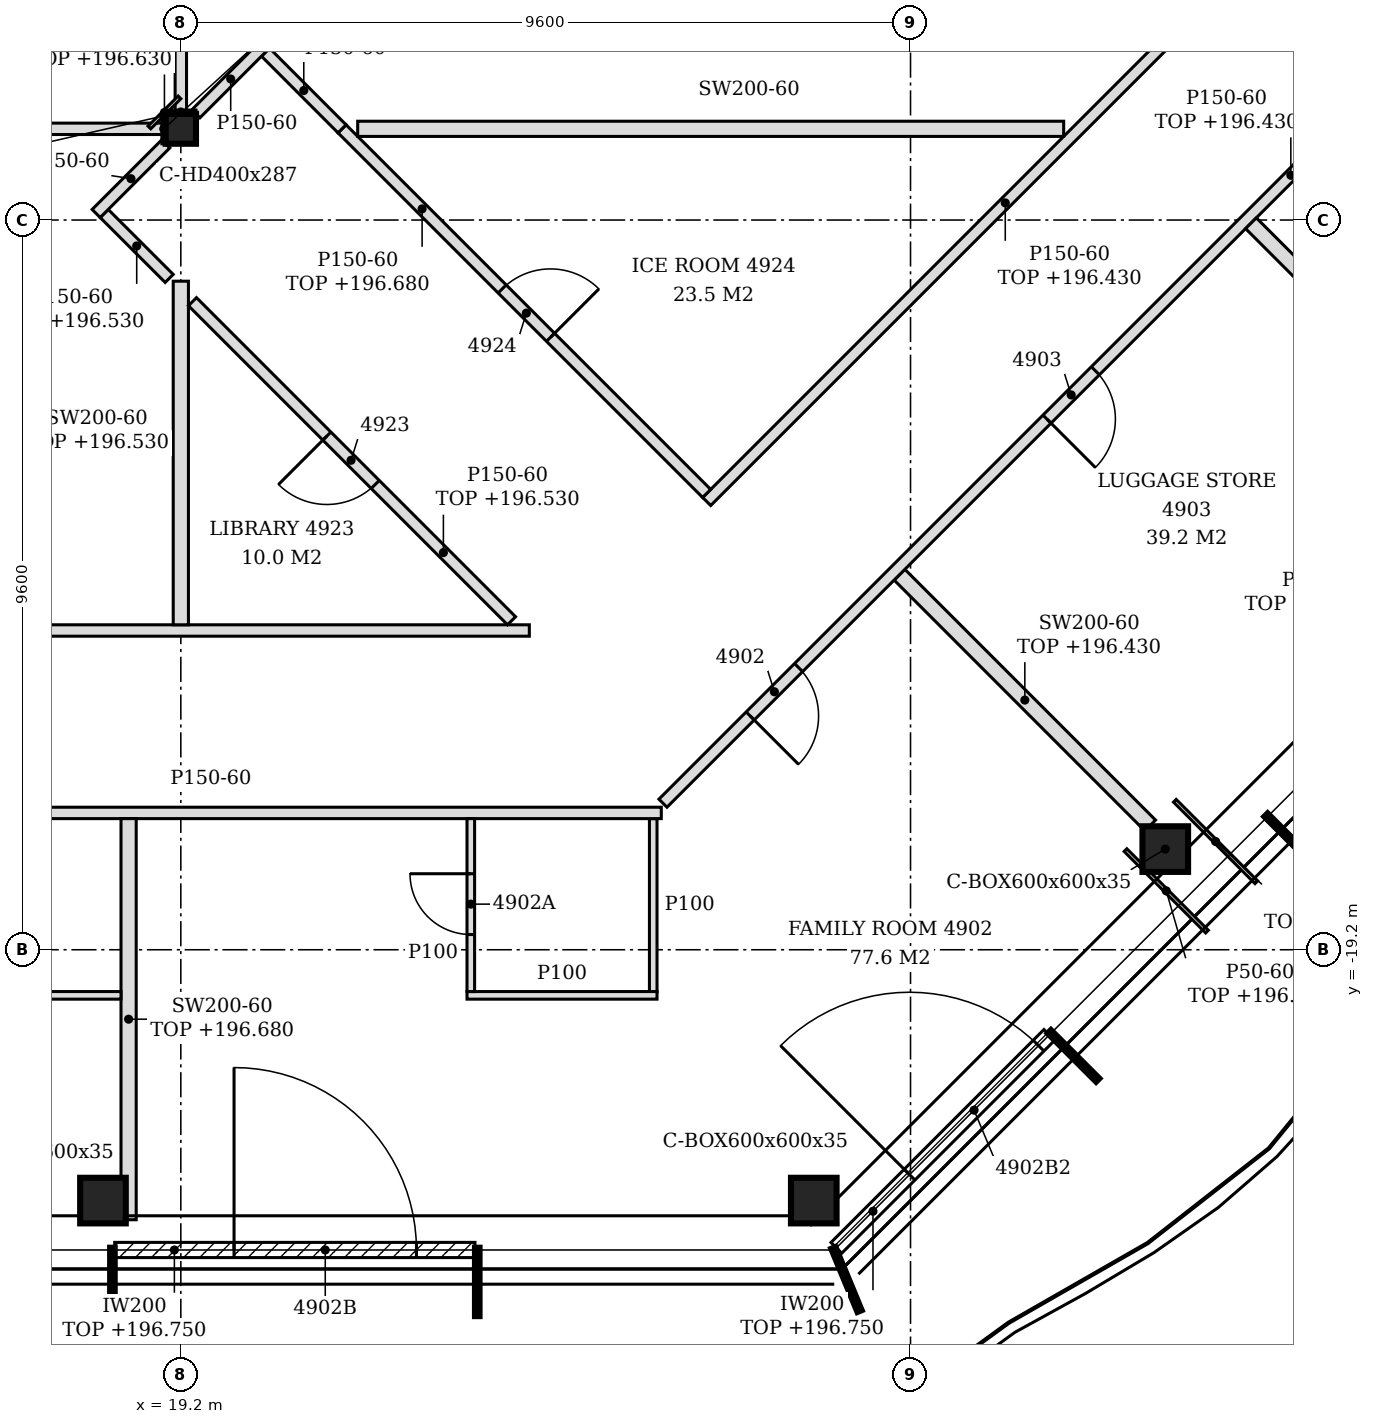
"""IFC4 building model, lengths in metres.
Left out: names, types, materials, properties, quantities, classifications, styles, units other than length and angle.
Written with IfcOpenShell. Run it as: python <this file> out.ifc"""

import sys

from ifc_helpers import new_model, si_unit, direction, frame, frame_2d, origin, origin_2d, place, context, subcontext, project, spatial, polyline, rectangle, hollow_rectangle, i_section, outline, extrude, clip, halfspace, element, fill, save


model = new_model("IFC4")
c1 = context("Model", 3, precision=1e-05, world=origin(), true_north=direction((0.0, 1.0)))
c2 = subcontext(c1, "Body", "Model", "MODEL_VIEW")
j1 = project(units=[si_unit("LENGTHUNIT", "METRE"), si_unit("PLANEANGLEUNIT", "RADIAN")], contexts=[c1])
p1 = place(None, origin())
s1 = spatial("IfcSite", under=j1, at=p1, CompositionType="ELEMENT")
p2 = place(p1, origin())
s2 = spatial("IfcBuilding", under=s1, at=p2, CompositionType="ELEMENT")
p3 = place(p2, frame((0.0, 0.0, 193.8)))
s3 = spatial("IfcBuildingStorey", under=s2, at=p3, CompositionType="ELEMENT", Elevation=193.8)
p4 = place(p3, frame((18.176, -22.5, -0.15), z_axis=(0.182857646312, -0.121927149838, 0.975549512489), x_axis=(0.554769659169, 0.83200398152, 0.0)))
e1 = element("IfcColumn", 1, at=p4, inside=s3, PredefinedType="COLUMN", context=c2, shape_type="Clipping", body=[
    clip(clip(extrude(hollow_rectangle(XDim=0.6, YDim=0.6, WallThickness=0.035, at=origin_2d()), origin(), (0.0, 0.0, 1.0), 3.69), halfspace(frame((0.0, 0.0, 0.021), z_axis=(0.0, 0.0, 1.0), x_axis=(1.0, 0.0, 0.0)), True)), halfspace(frame((0.0, 0.0, 3.668), z_axis=(0.0, 0.0, 1.0), x_axis=(1.0, 0.0, 0.0)), False)),
])
p5 = place(p3, frame((27.527, -22.5, -0.15), z_axis=(0.18292158996, -0.12192567461, 0.97553770906), x_axis=(0.55463074681, 0.832096589761, 0.0)))
e2 = element("IfcColumn", 2, at=p5, inside=s3, PredefinedType="COLUMN", context=c2, shape_type="Clipping", body=[
    clip(clip(extrude(hollow_rectangle(XDim=0.6, YDim=0.6, WallThickness=0.035, at=origin_2d()), origin(), (0.0, 0.0, 1.0), 3.69), halfspace(frame((0.0, 0.0, 0.021), z_axis=(0.0, 0.0, 1.0), x_axis=(1.0, 0.0, 0.0)), True)), halfspace(frame((0.0, 0.0, 3.668), z_axis=(0.0, 0.0, 1.0), x_axis=(1.0, 0.0, 0.0)), False)),
])
p6 = place(p3, frame((32.152, -17.876, -0.15), z_axis=(0.182857646312, -0.121927149838, 0.975549512489), x_axis=(0.554769659169, 0.83200398152, 0.0)))
e3 = element("IfcColumn", 3, at=p6, inside=s3, PredefinedType="COLUMN", context=c2, shape_type="Clipping", body=[
    clip(clip(extrude(hollow_rectangle(XDim=0.6, YDim=0.6, WallThickness=0.035, at=origin_2d()), origin(), (0.0, 0.0, 1.0), 3.69), halfspace(frame((0.0, 0.0, 0.021), z_axis=(0.0, 0.0, 1.0), x_axis=(1.0, 0.0, 0.0)), True)), halfspace(frame((0.0, 0.0, 3.668), z_axis=(0.0, 0.0, 1.0), x_axis=(1.0, 0.0, 0.0)), False)),
])
p7 = place(p3, frame((19.2, -8.4, -0.15), z_axis=(0.0, 0.0, 1.0), x_axis=(1.0, 0.0, 0.0)))
e4 = element("IfcColumn", 4, at=p7, inside=s3, PredefinedType="COLUMN", context=c2, shape_type="SweptSolid", body=[
    extrude(i_section(OverallWidth=0.399, OverallDepth=0.393, WebThickness=0.023, FlangeThickness=0.037, FilletRadius=0.015, at=origin_2d()), origin(), (0.0, 0.0, 1.0), 3.6),
])
p8 = place(p3, frame((18.33, -23.15, 0.0), z_axis=(0.0, 0.0, 1.0), x_axis=(1.0, 0.0, 0.0)))
e5 = element("IfcWall", 5, at=p8, inside=s3, PredefinedType="NOTDEFINED", context=c2, shape_type="SweptSolid", body=[
    extrude(rectangle(XDim=4.74, YDim=0.2, at=frame_2d((2.37, 0.0))), origin(), (0.0, 0.0, 1.0), 2.95),
])
p9 = place(p8, frame((1.57, 0.0, 0.0)))
e6 = element("IfcOpeningElement", 6, at=p9, cuts=e5, PredefinedType="OPENING", context=c2, shape_type="SweptSolid", body=[
    extrude(rectangle(XDim=2.4, YDim=2.4, at=frame_2d((1.2, 1.2))), frame((0.0, 0.11, 0.0), z_axis=(0.0, -1.0, 0.0), x_axis=(1.0, 0.0, 0.0)), (0.0, 0.0, 1.0), 0.22),
])
p10 = place(p3, frame((27.825, -23.122, 0.0), z_axis=(0.0, 0.0, 1.0), x_axis=(0.707106781187, 0.707106781187, 0.0)))
e7 = element("IfcWall", 7, at=p10, inside=s3, PredefinedType="NOTDEFINED", context=c2, shape_type="SweptSolid", body=[
    extrude(rectangle(XDim=3.962, YDim=0.2, at=frame_2d((1.981, 0.0))), origin(), (0.0, 0.0, 1.0), 2.95),
])
p11 = place(p10, frame((1.362, 0.0, 0.0)))
e8 = element("IfcOpeningElement", 8, at=p11, cuts=e7, PredefinedType="OPENING", context=c2, shape_type="SweptSolid", body=[
    extrude(rectangle(XDim=2.4, YDim=2.4, at=frame_2d((1.2, 1.2))), frame((0.0, 0.11, 0.0), z_axis=(0.0, -1.0, 0.0), x_axis=(1.0, 0.0, 0.0)), (0.0, 0.0, 1.0), 0.22),
])
p12 = place(p3, frame((18.513, -22.752, 0.0), z_axis=(0.0, 0.0, 1.0), x_axis=(0.0, 1.0, 0.0)))
e9 = element("IfcWall", 9, at=p12, inside=s3, PredefinedType="PARTITIONING", context=c2, shape_type="SweptSolid", body=[
    extrude(outline(polyline([(0.455, 0.0), (5.277, 0.0), (5.277, 0.863), (5.277, 1.725), (5.277, 2.587), (5.277, 2.88), (0.218, 2.88), (0.33, 2.587), (0.438, 1.725), (0.455, 0.863), (0.455, 0.0)])), frame((0.0, 0.1, 0.0), z_axis=(0.0, -1.0, 0.0), x_axis=(1.0, 0.0, 0.0)), (0.0, 0.0, 1.0), 0.2),
])
p13 = place(p3, frame((15.463, -19.8, 0.0), z_axis=(0.0, 0.0, 1.0), x_axis=(1.0, 0.0, 0.0)))
e10 = element("IfcWall", 10, at=p13, inside=s3, PredefinedType="PARTITIONING", context=c2, shape_type="SweptSolid", body=[
    extrude(rectangle(XDim=2.95, YDim=0.1, at=frame_2d((1.475, 0.0))), origin(), (0.0, 0.0, 1.0), 3.45),
])
p14 = place(p13, frame((1.1, 0.0, 0.0)))
e11 = element("IfcOpeningElement", 11, at=p14, cuts=e10, PredefinedType="OPENING", context=c2, shape_type="SweptSolid", body=[
    extrude(rectangle(XDim=0.9, YDim=2.1, at=frame_2d((0.45, 1.05))), frame((0.0, 0.06, 0.0), z_axis=(0.0, -1.0, 0.0), x_axis=(1.0, 0.0, 0.0)), (0.0, 0.0, 1.0), 0.12),
])
p15 = place(p3, frame((22.965, -19.8, 0.0), z_axis=(0.0, 0.0, 1.0), x_axis=(1.0, 0.0, 0.0)))
e12 = element("IfcWall", 12, at=p15, inside=s3, PredefinedType="PARTITIONING", context=c2, shape_type="SweptSolid", body=[
    extrude(rectangle(XDim=2.5, YDim=0.1, at=frame_2d((1.25, 0.0))), origin(), (0.0, 0.0, 1.0), 3.45),
])
p16 = place(p3, frame((23.015, -19.75, 0.0), z_axis=(0.0, 0.0, 1.0), x_axis=(0.0, 1.0, 0.0)))
e13 = element("IfcWall", 13, at=p16, inside=s3, PredefinedType="PARTITIONING", context=c2, shape_type="SweptSolid", body=[
    extrude(outline(polyline([(0.0, 0.0), (2.275, 0.0), (2.275, 3.45), (0.805, 3.45), (0.803, 2.88), (0.595, 2.88), (0.593, 3.45), (0.0, 3.45), (0.0, 0.0)])), frame((0.0, 0.05, 0.0), z_axis=(0.0, -1.0, 0.0), x_axis=(1.0, 0.0, 0.0)), (0.0, 0.0, 1.0), 0.1),
])
p17 = place(p16, frame((0.75, 0.0, 0.0)))
e14 = element("IfcOpeningElement", 14, at=p17, cuts=e13, PredefinedType="OPENING", context=c2, shape_type="SweptSolid", body=[
    extrude(rectangle(XDim=0.8, YDim=2.1, at=frame_2d((0.4, 1.05))), frame((0.0, 0.06, 0.0), z_axis=(0.0, -1.0, 0.0), x_axis=(1.0, 0.0, 0.0)), (0.0, 0.0, 1.0), 0.12),
])
p18 = place(p3, frame((25.415, -19.75, 0.0), z_axis=(0.0, 0.0, 1.0), x_axis=(0.0, 1.0, 0.0)))
e15 = element("IfcWall", 15, at=p18, inside=s3, PredefinedType="PARTITIONING", context=c2, shape_type="SweptSolid", body=[
    extrude(outline(polyline([(0.0, 0.0), (2.275, 0.0), (2.275, 3.45), (0.805, 3.45), (0.803, 2.88), (0.595, 2.88), (0.593, 3.45), (0.0, 3.45), (0.0, 0.0)])), frame((0.0, 0.05, 0.0), z_axis=(0.0, -1.0, 0.0), x_axis=(1.0, 0.0, 0.0)), (0.0, 0.0, 1.0), 0.1),
])
p19 = place(p3, frame((31.953, -17.565, 0.0), z_axis=(0.0, 0.0, 1.0), x_axis=(-0.707028264657, 0.707185288998, 0.0)))
e16 = element("IfcWall", 16, at=p19, inside=s3, PredefinedType="PARTITIONING", context=c2, shape_type="SweptSolid", body=[
    extrude(rectangle(XDim=4.664, YDim=0.2, at=frame_2d((2.332, 0.0))), origin(), (0.0, 0.0, 1.0), 2.63),
])
p20 = place(p3, frame((0.699, -17.4, 0.0), z_axis=(0.0, 0.0, 1.0), x_axis=(1.0, 0.0, 0.0)))
e17 = element("IfcWall", 17, at=p20, inside=s3, PredefinedType="PARTITIONING", context=c2, shape_type="SweptSolid", body=[
    extrude(outline(polyline([(0.0, 0.0), (24.822, 0.0), (24.822, 3.45), (18.651, 3.45), (18.649, 2.73), (18.351, 2.73), (18.349, 3.45), (6.651, 3.45), (6.649, 2.73), (6.351, 2.73), (6.349, 3.45), (0.0, 3.45), (0.0, 0.0)])), frame((0.0, 0.075, 0.0), z_axis=(0.0, -1.0, 0.0), x_axis=(1.0, 0.0, 0.0)), (0.0, 0.0, 1.0), 0.15),
])
p21 = place(p20, frame((11.188, 0.0, 0.0)))
e18 = element("IfcOpeningElement", 18, at=p21, cuts=e17, PredefinedType="OPENING", context=c2, shape_type="SweptSolid", body=[
    extrude(rectangle(XDim=0.9, YDim=2.1, at=frame_2d((0.45, 1.05))), frame((0.0, 0.085, 0.0), z_axis=(0.0, -1.0, 0.0), x_axis=(1.0, 0.0, 0.0)), (0.0, 0.0, 1.0), 0.17),
])
p22 = place(p20, frame((2.635, 0.0, 0.0)))
e19 = element("IfcOpeningElement", 19, at=p22, cuts=e17, PredefinedType="OPENING", context=c2, shape_type="SweptSolid", body=[
    extrude(rectangle(XDim=0.9, YDim=2.1, at=frame_2d((0.45, 1.05))), frame((0.0, 0.085, 0.0), z_axis=(0.0, -1.0, 0.0), x_axis=(1.0, 0.0, 0.0)), (0.0, 0.0, 1.0), 0.17),
])
p23 = place(p3, frame((25.543, -17.272, 0.0), z_axis=(0.0, 0.0, 1.0), x_axis=(0.707106781187, 0.707106781187, 0.0)))
e20 = element("IfcWall", 20, at=p23, inside=s3, PredefinedType="PARTITIONING", context=c2, shape_type="SweptSolid", body=[
    extrude(rectangle(XDim=15.319, YDim=0.15, at=frame_2d((7.659, 0.0))), origin(), (0.0, 0.0, 1.0), 2.63),
])
p24 = place(p23, frame((1.623, 0.0, 0.0)))
e21 = element("IfcOpeningElement", 21, at=p24, cuts=e20, PredefinedType="OPENING", context=c2, shape_type="SweptSolid", body=[
    extrude(rectangle(XDim=0.9, YDim=2.1, at=frame_2d((0.45, 1.05))), frame((0.0, 0.085, 0.0), z_axis=(0.0, -1.0, 0.0), x_axis=(1.0, 0.0, 0.0)), (0.0, 0.0, 1.0), 0.17),
])
p25 = place(p23, frame((7.145, 0.0, 0.0)))
e22 = element("IfcOpeningElement", 22, at=p25, cuts=e20, PredefinedType="OPENING", context=c2, shape_type="SweptSolid", body=[
    extrude(rectangle(XDim=0.9, YDim=2.1, at=frame_2d((0.45, 1.05))), frame((0.0, 0.085, 0.0), z_axis=(0.0, -1.0, 0.0), x_axis=(1.0, 0.0, 0.0)), (0.0, 0.0, 1.0), 0.17),
])
p26 = place(p3, frame((1.694, -15.0, 0.0), z_axis=(0.0, 0.0, 1.0), x_axis=(1.0, 0.0, 0.0)))
e23 = element("IfcWall", 23, at=p26, inside=s3, PredefinedType="PARTITIONING", context=c2, shape_type="SweptSolid", body=[
    extrude(outline(polyline([(0.0, 0.0), (22.091, 0.0), (22.091, 3.45), (17.656, 3.45), (17.654, 2.73), (17.356, 2.73), (17.354, 3.45), (5.656, 3.45), (5.654, 2.73), (5.356, 2.73), (5.354, 3.45), (0.0, 3.45), (0.0, 0.0)])), frame((0.0, 0.075, 0.0), z_axis=(0.0, -1.0, 0.0), x_axis=(1.0, 0.0, 0.0)), (0.0, 0.0, 1.0), 0.15),
])
p27 = place(p3, frame((19.2, -14.925, 0.0), z_axis=(0.0, 0.0, 1.0), x_axis=(0.0, 1.0, 0.0)))
e24 = element("IfcWall", 24, at=p27, inside=s3, PredefinedType="PARTITIONING", context=c2, shape_type="SweptSolid", body=[
    extrude(rectangle(XDim=4.521, YDim=0.2, at=frame_2d((2.26, 0.0))), origin(), (0.0, 0.0, 1.0), 2.73),
])
p28 = place(p3, frame((23.551, -14.872, 0.0), z_axis=(0.0, 0.0, 1.0), x_axis=(-0.707106781187, 0.707106781187, 0.0)))
e25 = element("IfcWall", 25, at=p28, inside=s3, PredefinedType="PARTITIONING", context=c2, shape_type="SweptSolid", body=[
    extrude(rectangle(XDim=5.937, YDim=0.15, at=frame_2d((2.968, 0.0))), origin(), (0.0, 0.0, 1.0), 2.73),
])
p29 = place(p28, frame((2.536, 0.0, 0.0)))
e26 = element("IfcOpeningElement", 26, at=p29, cuts=e25, PredefinedType="OPENING", context=c2, shape_type="SweptSolid", body=[
    extrude(rectangle(XDim=0.9, YDim=2.1, at=frame_2d((0.45, 1.05))), frame((0.0, 0.085, 0.0), z_axis=(0.0, -1.0, 0.0), x_axis=(1.0, 0.0, 0.0)), (0.0, 0.0, 1.0), 0.17),
])
p30 = place(p3, frame((26.118, -13.303, 0.0), z_axis=(0.0, 0.0, 1.0), x_axis=(0.707117766991, 0.707095795212, 0.0)))
e27 = element("IfcWall", 27, at=p30, inside=s3, PredefinedType="PARTITIONING", context=c2, shape_type="SweptSolid", body=[
    extrude(rectangle(XDim=11.112, YDim=0.15, at=frame_2d((5.556, 0.0))), origin(), (0.0, 0.0, 1.0), 2.63),
])
p31 = place(p3, frame((26.118, -13.197, 0.0), z_axis=(0.0, 0.0, 1.0), x_axis=(-0.707088787045, 0.70712477487, 0.0)))
e28 = element("IfcWall", 28, at=p31, inside=s3, PredefinedType="PARTITIONING", context=c2, shape_type="SweptSolid", body=[
    extrude(rectangle(XDim=6.784, YDim=0.15, at=frame_2d((3.392, 0.0))), origin(), (0.0, 0.0, 1.0), 2.88),
])
p32 = place(p31, frame((2.905, 0.0, 0.0)))
e29 = element("IfcOpeningElement", 29, at=p32, cuts=e28, PredefinedType="OPENING", context=c2, shape_type="SweptSolid", body=[
    extrude(rectangle(XDim=0.9, YDim=2.1, at=frame_2d((0.45, 1.05))), frame((0.0, 0.085, 0.0), z_axis=(0.0, -1.0, 0.0), x_axis=(1.0, 0.0, 0.0)), (0.0, 0.0, 1.0), 0.17),
])
p33 = place(p3, frame((36.577, -12.941, 0.0), z_axis=(0.0, 0.0, 1.0), x_axis=(-0.707028264657, 0.707185288998, 0.0)))
e30 = element("IfcWall", 30, at=p33, inside=s3, PredefinedType="PARTITIONING", context=c2, shape_type="SweptSolid", body=[
    extrude(rectangle(XDim=4.664, YDim=0.2, at=frame_2d((2.332, 0.0))), origin(), (0.0, 0.0, 1.0), 3.45),
])
p34 = place(p3, frame((19.047, -10.368, 0.0), z_axis=(0.0, 0.0, 1.0), x_axis=(-0.707409718716, 0.706803713817, 0.0)))
e31 = element("IfcWall", 31, at=p34, inside=s3, PredefinedType="PARTITIONING", context=c2, shape_type="SweptSolid", body=[
    extrude(rectangle(XDim=1.208, YDim=0.15, at=frame_2d((0.604, 0.0))), origin(), (0.0, 0.0, 1.0), 2.73),
])
p35 = place(p3, frame((18.086, -9.514, 0.0), z_axis=(0.0, 0.0, 1.0), x_axis=(0.707106781187, 0.707106781187, 0.0)))
e32 = element("IfcWall", 32, at=p35, inside=s3, PredefinedType="PARTITIONING", context=c2, shape_type="SweptSolid", body=[
    extrude(rectangle(XDim=1.295, YDim=0.15, at=frame_2d((0.648, 0.0))), origin(), (0.0, 0.0, 1.0), 3.45),
])
p36 = place(p3, frame((7.399, -8.4, 0.0), z_axis=(0.0, 0.0, 1.0), x_axis=(1.0, 0.0, 0.0)))
e33 = element("IfcWall", 33, at=p36, inside=s3, PredefinedType="PARTITIONING", context=c2, shape_type="SweptSolid", body=[
    extrude(rectangle(XDim=11.601, YDim=0.15, at=frame_2d((5.801, 0.0))), origin(), (0.0, 0.0, 1.0), 2.83),
])
p37 = place(p36, frame((0.551, 0.0, 0.0)))
e34 = element("IfcOpeningElement", 34, at=p37, cuts=e33, PredefinedType="OPENING", context=c2, shape_type="SweptSolid", body=[
    extrude(rectangle(XDim=0.9, YDim=2.1, at=frame_2d((0.45, 1.05))), frame((0.0, 0.085, 0.0), z_axis=(0.0, -1.0, 0.0), x_axis=(1.0, 0.0, 0.0)), (0.0, 0.0, 1.0), 0.17),
])
p38 = place(p3, frame((21.321, -8.4, 0.0), z_axis=(0.0, 0.0, 1.0), x_axis=(-0.706763941595, 0.707449454633, 0.0)))
e35 = element("IfcWall", 35, at=p38, inside=s3, PredefinedType="PARTITIONING", context=c2, shape_type="SweptSolid", body=[
    extrude(rectangle(XDim=1.425, YDim=0.15, at=frame_2d((0.712, 0.0))), origin(), (0.0, 0.0, 1.0), 3.45),
])
p39 = place(p3, frame((21.527, -8.4, 0.0), z_axis=(0.0, 0.0, 1.0), x_axis=(1.0, 0.0, 0.0)))
e36 = element("IfcWall", 36, at=p39, inside=s3, PredefinedType="PARTITIONING", context=c2, shape_type="SweptSolid", body=[
    extrude(rectangle(XDim=9.288, YDim=0.2, at=frame_2d((4.644, 0.0))), origin(), (0.0, 0.0, 1.0), 3.45),
])
p40 = place(p3, frame((19.2, -8.204, 0.0), z_axis=(0.0, 0.0, 1.0), x_axis=(0.0, 1.0, 0.0)))
e37 = element("IfcWall", 37, at=p40, inside=s3, PredefinedType="PARTITIONING", context=c2, shape_type="SweptSolid", body=[
    extrude(rectangle(XDim=4.529, YDim=0.15, at=frame_2d((2.264, 0.0))), origin(), (0.0, 0.0, 1.0), 2.83),
])
p41 = place(p3, frame((19.398, -8.202, 0.0), z_axis=(0.0, 0.0, 1.0), x_axis=(0.707200993001, 0.707012556818, 0.0)))
e38 = element("IfcWall", 38, at=p41, inside=s3, PredefinedType="PARTITIONING", context=c2, shape_type="SweptSolid", body=[
    extrude(rectangle(XDim=1.296, YDim=0.15, at=frame_2d((0.648, 0.0))), origin(), (0.0, 0.0, 1.0), 3.45),
])
p42 = place(p3, frame((32.7, -18.961, 0.0), z_axis=(0.0, 0.0, 1.0), x_axis=(-0.707026268033, 0.707187285174, 0.0)))
e39 = element("IfcWall", 39, at=p42, inside=s3, PredefinedType="PARTITIONING", context=c2, shape_type="SweptSolid", body=[
    extrude(rectangle(XDim=1.516, YDim=0.05, at=frame_2d((0.758, 0.0))), origin(), (0.0, 0.0, 1.0), 2.93),
])
p43 = place(p3, frame((33.35, -18.312, 0.0), z_axis=(0.0, 0.0, 1.0), x_axis=(-0.707026268033, 0.707187285174, 0.0)))
e40 = element("IfcWall", 40, at=p43, inside=s3, PredefinedType="PARTITIONING", context=c2, shape_type="SweptSolid", body=[
    extrude(rectangle(XDim=1.516, YDim=0.05, at=frame_2d((0.758, 0.0))), origin(), (0.0, 0.0, 1.0), 2.63),
])
p44 = place(p3, frame((18.786, -8.382, 0.0), z_axis=(0.0, 0.0, 1.0), x_axis=(0.707106781187, 0.707106781187, 0.0)))
e41 = element("IfcWall", 41, at=p44, inside=s3, PredefinedType="PARTITIONING", context=c2, shape_type="SweptSolid", body=[
    extrude(rectangle(XDim=0.56, YDim=0.05, at=frame_2d((0.28, 0.0))), origin(), (0.0, 0.0, 1.0), 2.83),
])
p45 = place(p3, frame((19.0, -8.178, 0.0), z_axis=(0.0, 0.0, 1.0), x_axis=(1.0, 0.0, 0.0)))
e42 = element("IfcWall", 42, at=p45, inside=s3, PredefinedType="PARTITIONING", context=c2, shape_type="SweptSolid", body=[
    extrude(rectangle(XDim=0.399, YDim=0.05, at=frame_2d((0.199, 0.0))), origin(), (0.0, 0.0, 1.0), 2.83),
])
p46 = place(p3, frame((18.976, -8.596, 0.0), z_axis=(0.0, 0.0, 1.0), x_axis=(0.0, 1.0, 0.0)))
e43 = element("IfcWall", 43, at=p46, inside=s3, PredefinedType="PARTITIONING", context=c2, shape_type="SweptSolid", body=[
    extrude(rectangle(XDim=0.393, YDim=0.05, at=frame_2d((0.196, 0.0))), origin(), (0.0, 0.0, 1.0), 2.83),
])
p47 = place(p9, origin())
e44 = element("IfcDoor", 44, at=p47, inside=s3, OperationType="SINGLE_SWING_LEFT", PredefinedType="DOOR", context=c2, shape_type="SweptSolid", body=[
    extrude(rectangle(XDim=2.4, YDim=2.4, at=frame_2d((1.2, 1.2))), frame((0.0, 0.025, 0.0), z_axis=(0.0, -1.0, 0.0), x_axis=(1.0, 0.0, 0.0)), (0.0, 0.0, 1.0), 0.05),
])
fill(e6, e44)
p48 = place(p11, origin())
e45 = element("IfcDoor", 45, at=p48, inside=s3, OperationType="SINGLE_SWING_LEFT", PredefinedType="DOOR", context=c2, shape_type="SweptSolid", body=[
    extrude(rectangle(XDim=2.4, YDim=2.4, at=frame_2d((1.2, 1.2))), frame((0.0, 0.025, 0.0), z_axis=(0.0, -1.0, 0.0), x_axis=(1.0, 0.0, 0.0)), (0.0, 0.0, 1.0), 0.05),
])
fill(e8, e45)
p49 = place(p24, frame((0.9, 0.0, 0.0), z_axis=(0.0, 0.0, 1.0), x_axis=(-1.0, 0.0, 0.0)))
e46 = element("IfcDoor", 46, at=p49, inside=s3, OperationType="SINGLE_SWING_RIGHT", PredefinedType="DOOR", context=c2, shape_type="SweptSolid", body=[
    extrude(rectangle(XDim=0.9, YDim=2.1, at=frame_2d((0.45, 1.05))), frame((0.0, 0.025, 0.0), z_axis=(0.0, -1.0, 0.0), x_axis=(1.0, 0.0, 0.0)), (0.0, 0.0, 1.0), 0.05),
])
fill(e21, e46)
p50 = place(p17, origin())
e47 = element("IfcDoor", 47, at=p50, inside=s3, OperationType="SINGLE_SWING_RIGHT", PredefinedType="DOOR", context=c2, shape_type="SweptSolid", body=[
    extrude(rectangle(XDim=0.8, YDim=2.1, at=frame_2d((0.4, 1.05))), frame((0.0, 0.025, 0.0), z_axis=(0.0, -1.0, 0.0), x_axis=(1.0, 0.0, 0.0)), (0.0, 0.0, 1.0), 0.05),
])
fill(e14, e47)
p51 = place(p25, frame((0.9, 0.0, 0.0), z_axis=(0.0, 0.0, 1.0), x_axis=(-1.0, 0.0, 0.0)))
e48 = element("IfcDoor", 48, at=p51, inside=s3, OperationType="SINGLE_SWING_RIGHT", PredefinedType="DOOR", context=c2, shape_type="SweptSolid", body=[
    extrude(rectangle(XDim=0.9, YDim=2.1, at=frame_2d((0.45, 1.05))), frame((0.0, 0.025, 0.0), z_axis=(0.0, -1.0, 0.0), x_axis=(1.0, 0.0, 0.0)), (0.0, 0.0, 1.0), 0.05),
])
fill(e22, e48)
p52 = place(p29, origin())
e49 = element("IfcDoor", 49, at=p52, inside=s3, OperationType="SINGLE_SWING_RIGHT", PredefinedType="DOOR", context=c2, shape_type="SweptSolid", body=[
    extrude(rectangle(XDim=0.9, YDim=2.1, at=frame_2d((0.45, 1.05))), frame((0.0, 0.025, 0.0), z_axis=(0.0, -1.0, 0.0), x_axis=(1.0, 0.0, 0.0)), (0.0, 0.0, 1.0), 0.05),
])
fill(e26, e49)
p53 = place(p32, frame((0.9, 0.0, 0.0), z_axis=(0.0, 0.0, 1.0), x_axis=(-1.0, 0.0, 0.0)))
e50 = element("IfcDoor", 50, at=p53, inside=s3, OperationType="SINGLE_SWING_RIGHT", PredefinedType="DOOR", context=c2, shape_type="SweptSolid", body=[
    extrude(rectangle(XDim=0.9, YDim=2.1, at=frame_2d((0.45, 1.05))), frame((0.0, 0.025, 0.0), z_axis=(0.0, -1.0, 0.0), x_axis=(1.0, 0.0, 0.0)), (0.0, 0.0, 1.0), 0.05),
])
fill(e29, e50)
save(model, sys.argv[1])
